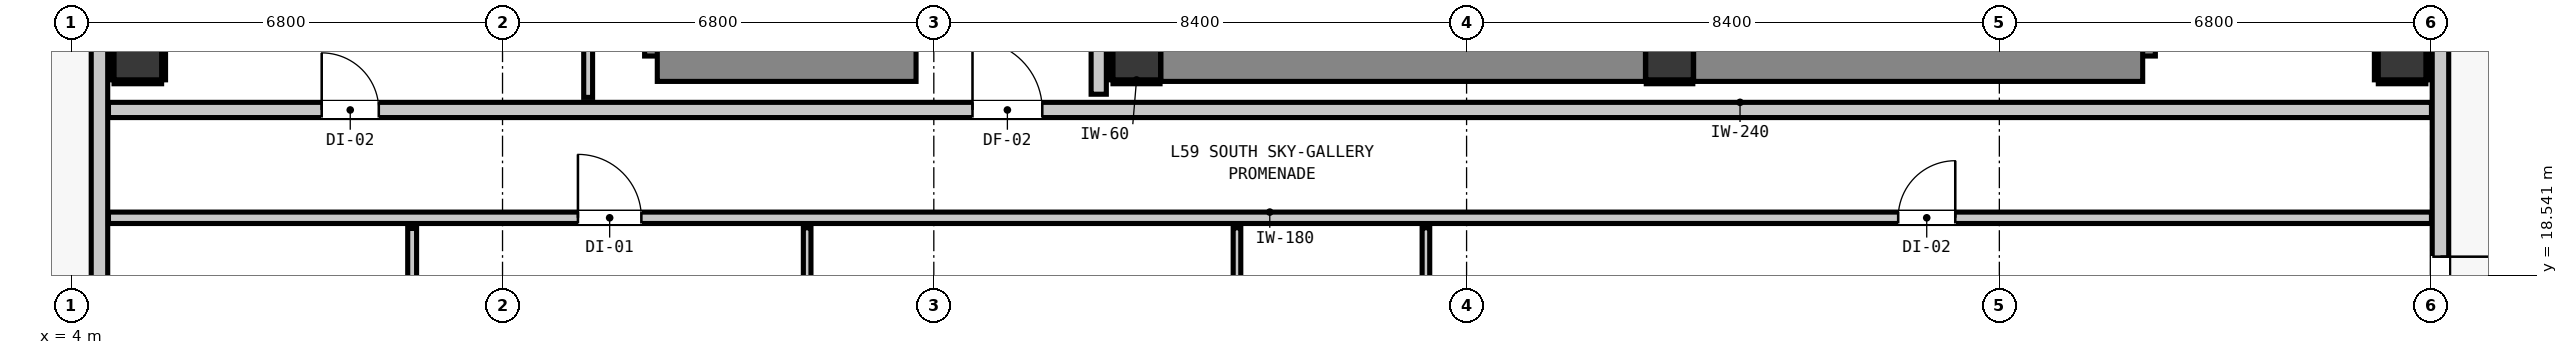
"""IFC4 building model, lengths in metres.
Left out: names, types, materials, properties, quantities, classifications, styles, units other than length and angle.
Written with IfcOpenShell. Run it as: python <this file> out.ifc"""

import sys

from ifc_helpers import new_model, si_unit, direction, frame, frame_2d, origin, origin_2d, place, context, subcontext, project, spatial, rectangle, extrude, element, fill, save


model = new_model("IFC4")
c1 = context("Model", 3, precision=1e-05, world=origin(), true_north=direction((0.0, 1.0)))
c2 = subcontext(c1, "Body", "Model", "MODEL_VIEW")
j1 = project(units=[si_unit("LENGTHUNIT", "METRE"), si_unit("PLANEANGLEUNIT", "RADIAN")], contexts=[c1])
p1 = place(None, origin())
s1 = spatial("IfcSite", under=j1, at=p1, CompositionType="ELEMENT")
p2 = place(p1, origin())
s2 = spatial("IfcBuilding", under=s1, at=p2, CompositionType="ELEMENT")
p3 = place(p2, frame((0.0, 0.0, 203.44)))
s3 = spatial("IfcBuildingStorey", under=s2, at=p3, CompositionType="ELEMENT", Elevation=203.44)
for number, where, z_axis, x_axis in (
    (1, (20.8, 22.0, 0.0), (0.0, 0.0, 1.0), (1.0, 0.0, 0.0)),
    (2, (29.2, 22.0, 0.0), (0.0, 0.0, 1.0), (1.0, 0.0, 0.0)),
):
    element("IfcColumn", number, at=place(p3, frame(where, z_axis=z_axis, x_axis=x_axis)), inside=s3, PredefinedType="COLUMN", context=c2, shape_type="SweptSolid", body=[
        extrude(rectangle(XDim=0.75, YDim=0.75, at=origin_2d()), origin(), (0.0, 0.0, 1.0), 3.32),
    ])
p4 = place(p3, frame((13.44, 22.0, 0.0), z_axis=(0.0, 0.0, 1.0), x_axis=(0.0, 1.0, 0.0)))
e3 = element("IfcWall", 3, at=p4, inside=s3, PredefinedType="SHEAR", context=c2, shape_type="SweptSolid", body=[
    extrude(rectangle(XDim=8.32, YDim=0.8, at=frame_2d((4.16, 0.0))), origin(), (0.0, 0.0, 1.0), 3.32),
])
p5 = place(p3, frame((13.24, 22.0, 0.0), z_axis=(0.0, 0.0, 1.0), x_axis=(1.0, 0.0, 0.0)))
e4 = element("IfcWall", 4, at=p5, inside=s3, PredefinedType="SHEAR", context=c2, shape_type="SweptSolid", body=[
    extrude(rectangle(XDim=4.08, YDim=0.8, at=frame_2d((2.04, 0.0))), origin(), (0.0, 0.0, 1.0), 3.32),
])
p6 = place(p3, frame((36.46, 22.0, 0.0), z_axis=(0.0, 0.0, 1.0), x_axis=(0.0, 1.0, 0.0)))
e5 = element("IfcWall", 5, at=p6, inside=s3, PredefinedType="SHEAR", context=c2, shape_type="SweptSolid", body=[
    extrude(rectangle(XDim=8.32, YDim=0.8, at=frame_2d((4.16, 0.0))), origin(), (0.0, 0.0, 1.0), 3.32),
])
p7 = place(p3, frame((29.58, 22.0, 0.0), z_axis=(0.0, 0.0, 1.0), x_axis=(1.0, 0.0, 0.0)))
e6 = element("IfcWall", 6, at=p7, inside=s3, PredefinedType="SHEAR", context=c2, shape_type="SweptSolid", body=[
    extrude(rectangle(XDim=7.08, YDim=0.8, at=frame_2d((3.54, 0.0))), origin(), (0.0, 0.0, 1.0), 3.32),
])
p8 = place(p3, frame((21.18, 22.0, 0.0), z_axis=(0.0, 0.0, 1.0), x_axis=(1.0, 0.0, 0.0)))
e7 = element("IfcWall", 7, at=p8, inside=s3, PredefinedType="SHEAR", context=c2, shape_type="SweptSolid", body=[
    extrude(rectangle(XDim=7.64, YDim=0.8, at=frame_2d((3.82, 0.0))), origin(), (0.0, 0.0, 1.0), 3.32),
])
for number, where, z_axis, x_axis in (
    (8, (5.05, 22.0, 0.0), (0.0, 0.0, 1.0), (1.0, 0.0, 0.0)),
    (9, (40.75, 22.0, 0.0), (0.0, 0.0, 1.0), (1.0, 0.0, 0.0)),
):
    element("IfcColumn", number, at=place(p3, frame(where, z_axis=z_axis, x_axis=x_axis)), inside=s3, PredefinedType="COLUMN", context=c2, shape_type="SweptSolid", body=[
        extrude(rectangle(XDim=0.75, YDim=0.75, at=origin_2d()), origin(), (0.0, 0.0, 1.0), 3.32),
    ])
p9 = place(p3, frame((4.445, 12.345, 0.0), z_axis=(0.0, 0.0, 1.0), x_axis=(0.0, 1.0, 0.0)))
e10 = element("IfcWall", 10, at=p9, inside=s3, PredefinedType="STANDARD", context=c2, shape_type="SweptSolid", body=[
    extrude(rectangle(XDim=30.31, YDim=0.26, at=frame_2d((15.155, 0.0))), origin(), (0.0, 0.0, 1.0), 3.1),
])
p10 = place(p9, frame((0.91, 0.0, 0.0)))
e11 = element("IfcOpeningElement", 11, at=p10, cuts=e10, PredefinedType="OPENING", context=c2, shape_type="SweptSolid", body=[
    extrude(rectangle(XDim=1.0, YDim=2.15, at=frame_2d((0.5, 1.075))), frame((0.0, 0.14, 0.0), z_axis=(0.0, -1.0, 0.0), x_axis=(1.0, 0.0, 0.0)), (0.0, 0.0, 1.0), 0.28),
])
p11 = place(p9, frame((2.322, 0.0, 0.85)))
e12 = element("IfcOpeningElement", 12, at=p11, cuts=e10, PredefinedType="OPENING", context=c2, shape_type="SweptSolid", body=[
    extrude(rectangle(XDim=0.58, YDim=1.5, at=frame_2d((0.29, 0.75))), frame((0.0, 0.14, 0.0), z_axis=(0.0, -1.0, 0.0), x_axis=(1.0, 0.0, 0.0)), (0.0, 0.0, 1.0), 0.28),
])
p12 = place(p9, frame((13.405, 0.0, 0.85)))
e13 = element("IfcOpeningElement", 13, at=p12, cuts=e10, PredefinedType="OPENING", context=c2, shape_type="SweptSolid", body=[
    extrude(rectangle(XDim=1.2, YDim=1.8, at=frame_2d((0.6, 0.9))), frame((0.0, 0.14, 0.0), z_axis=(0.0, -1.0, 0.0), x_axis=(1.0, 0.0, 0.0)), (0.0, 0.0, 1.0), 0.28),
])
p13 = place(p3, frame((41.355, 42.655, 0.0), z_axis=(0.0, 0.0, 1.0), x_axis=(0.0, -1.0, 0.0)))
e14 = element("IfcWall", 14, at=p13, inside=s3, PredefinedType="STANDARD", context=c2, shape_type="SweptSolid", body=[
    extrude(rectangle(XDim=30.31, YDim=0.26, at=frame_2d((15.155, 0.0))), origin(), (0.0, 0.0, 1.0), 3.1),
])
p14 = place(p13, frame((23.818, 0.0, 0.0)))
e15 = element("IfcOpeningElement", 15, at=p14, cuts=e14, PredefinedType="OPENING", context=c2, shape_type="SweptSolid", body=[
    extrude(rectangle(XDim=1.0, YDim=2.15, at=frame_2d((0.5, 1.075))), frame((0.0, 0.14, 0.0), z_axis=(0.0, -1.0, 0.0), x_axis=(1.0, 0.0, 0.0)), (0.0, 0.0, 1.0), 0.28),
])
p15 = place(p13, frame((27.019, 0.0, 0.85)))
e16 = element("IfcOpeningElement", 16, at=p15, cuts=e14, PredefinedType="OPENING", context=c2, shape_type="SweptSolid", body=[
    extrude(rectangle(XDim=1.2, YDim=1.8, at=frame_2d((0.6, 0.9))), frame((0.0, 0.14, 0.0), z_axis=(0.0, -1.0, 0.0), x_axis=(1.0, 0.0, 0.0)), (0.0, 0.0, 1.0), 0.28),
])
p16 = place(p3, frame((4.587, 21.15, 0.0), z_axis=(0.0, 0.0, 1.0), x_axis=(1.0, 0.0, 0.0)))
e17 = element("IfcWall", 17, at=p16, inside=s3, PredefinedType="PARTITIONING", context=c2, shape_type="SweptSolid", body=[
    extrude(rectangle(XDim=36.626, YDim=0.24, at=frame_2d((18.313, 0.0))), origin(), (0.0, 0.0, 1.0), 3.1),
])
p17 = place(p16, frame((13.623, 0.0, 0.0)))
e18 = element("IfcOpeningElement", 18, at=p17, cuts=e17, PredefinedType="OPENING", context=c2, shape_type="SweptSolid", body=[
    extrude(rectangle(XDim=1.1, YDim=2.15, at=frame_2d((0.55, 1.075))), frame((0.0, 0.13, 0.0), z_axis=(0.0, -1.0, 0.0), x_axis=(1.0, 0.0, 0.0)), (0.0, 0.0, 1.0), 0.26),
])
p18 = place(p16, frame((3.362, 0.0, 0.0)))
e19 = element("IfcOpeningElement", 19, at=p18, cuts=e17, PredefinedType="OPENING", context=c2, shape_type="SweptSolid", body=[
    extrude(rectangle(XDim=0.9, YDim=2.1, at=frame_2d((0.45, 1.05))), frame((0.0, 0.13, 0.0), z_axis=(0.0, -1.0, 0.0), x_axis=(1.0, 0.0, 0.0)), (0.0, 0.0, 1.0), 0.26),
])
p19 = place(p3, frame((4.587, 19.45, 0.0), z_axis=(0.0, 0.0, 1.0), x_axis=(1.0, 0.0, 0.0)))
e20 = element("IfcWall", 20, at=p19, inside=s3, PredefinedType="PARTITIONING", context=c2, shape_type="SweptSolid", body=[
    extrude(rectangle(XDim=36.626, YDim=0.18, at=frame_2d((18.313, 0.0))), origin(), (0.0, 0.0, 1.0), 3.1),
])
p20 = place(p19, frame((7.402, 0.0, 0.0)))
e21 = element("IfcOpeningElement", 21, at=p20, cuts=e20, PredefinedType="OPENING", context=c2, shape_type="SweptSolid", body=[
    extrude(rectangle(XDim=1.0, YDim=2.15, at=frame_2d((0.5, 1.075))), frame((0.0, 0.1, 0.0), z_axis=(0.0, -1.0, 0.0), x_axis=(1.0, 0.0, 0.0)), (0.0, 0.0, 1.0), 0.2),
])
p21 = place(p19, frame((28.218, 0.0, 0.0)))
e22 = element("IfcOpeningElement", 22, at=p21, cuts=e20, PredefinedType="OPENING", context=c2, shape_type="SweptSolid", body=[
    extrude(rectangle(XDim=0.9, YDim=2.1, at=frame_2d((0.45, 1.05))), frame((0.0, 0.1, 0.0), z_axis=(0.0, -1.0, 0.0), x_axis=(1.0, 0.0, 0.0)), (0.0, 0.0, 1.0), 0.2),
])
p22 = place(p3, frame((20.2, 21.398, 0.0), z_axis=(0.0, 0.0, 1.0), x_axis=(0.0, 1.0, 0.0)))
e23 = element("IfcWall", 23, at=p22, inside=s3, PredefinedType="PARTITIONING", context=c2, shape_type="SweptSolid", body=[
    extrude(rectangle(XDim=6.754, YDim=0.24, at=frame_2d((3.377, 0.0))), origin(), (0.0, 0.0, 1.0), 3.1),
])
p23 = place(p3, frame((9.375, 15.707, 0.0), z_axis=(0.0, 0.0, 1.0), x_axis=(0.0, 1.0, 0.0)))
e24 = element("IfcWall", 24, at=p23, inside=s3, PredefinedType="PARTITIONING", context=c2, shape_type="SweptSolid", body=[
    extrude(rectangle(XDim=3.575, YDim=0.14, at=frame_2d((1.788, 0.0))), origin(), (0.0, 0.0, 1.0), 2.477),
])
p24 = place(p23, frame((1.355, 0.0, 0.0)))
e25 = element("IfcOpeningElement", 25, at=p24, cuts=e24, PredefinedType="OPENING", context=c2, shape_type="SweptSolid", body=[
    extrude(rectangle(XDim=0.86, YDim=2.02, at=frame_2d((0.43, 1.01))), frame((0.0, 0.08, 0.0), z_axis=(0.0, -1.0, 0.0), x_axis=(1.0, 0.0, 0.0)), (0.0, 0.0, 1.0), 0.16),
])
p25 = place(p3, frame((12.15, 21.348, 0.0), z_axis=(0.0, 0.0, 1.0), x_axis=(0.0, 1.0, 0.0)))
e26 = element("IfcWall", 26, at=p25, inside=s3, PredefinedType="PARTITIONING", context=c2, shape_type="SweptSolid", body=[
    extrude(rectangle(XDim=13.004, YDim=0.14, at=frame_2d((6.502, 0.0))), origin(), (0.0, 0.0, 1.0), 3.1),
])
p26 = place(p3, frame((15.603, 15.697, 0.0), z_axis=(0.0, 0.0, 1.0), x_axis=(0.0, 1.0, 0.0)))
e27 = element("IfcWall", 27, at=p26, inside=s3, PredefinedType="PARTITIONING", context=c2, shape_type="SweptSolid", body=[
    extrude(rectangle(XDim=3.595, YDim=0.12, at=frame_2d((1.797, 0.0))), origin(), (0.0, 0.0, 1.0), 3.1),
])
p27 = place(p26, frame((1.345, 0.0, 0.0)))
e28 = element("IfcOpeningElement", 28, at=p27, cuts=e27, PredefinedType="OPENING", context=c2, shape_type="SweptSolid", body=[
    extrude(rectangle(XDim=0.9, YDim=2.1, at=frame_2d((0.45, 1.05))), frame((0.0, 0.07, 0.0), z_axis=(0.0, -1.0, 0.0), x_axis=(1.0, 0.0, 0.0)), (0.0, 0.0, 1.0), 0.14),
])
p28 = place(p3, frame((22.38, 15.697, 0.0), z_axis=(0.0, 0.0, 1.0), x_axis=(0.0, 1.0, 0.0)))
e29 = element("IfcWall", 29, at=p28, inside=s3, PredefinedType="PARTITIONING", context=c2, shape_type="SweptSolid", body=[
    extrude(rectangle(XDim=3.595, YDim=0.12, at=frame_2d((1.797, 0.0))), origin(), (0.0, 0.0, 1.0), 3.1),
])
p29 = place(p28, frame((1.358, 0.0, 0.0)))
e30 = element("IfcOpeningElement", 30, at=p29, cuts=e29, PredefinedType="OPENING", context=c2, shape_type="SweptSolid", body=[
    extrude(rectangle(XDim=0.9, YDim=2.1, at=frame_2d((0.45, 1.05))), frame((0.0, 0.07, 0.0), z_axis=(0.0, -1.0, 0.0), x_axis=(1.0, 0.0, 0.0)), (0.0, 0.0, 1.0), 0.14),
])
p30 = place(p3, frame((25.359, 15.697, 0.0), z_axis=(0.0, 0.0, 1.0), x_axis=(0.0, 1.0, 0.0)))
e31 = element("IfcWall", 31, at=p30, inside=s3, PredefinedType="PARTITIONING", context=c2, shape_type="SweptSolid", body=[
    extrude(rectangle(XDim=3.595, YDim=0.12, at=frame_2d((1.797, 0.0))), origin(), (0.0, 0.0, 1.0), 3.1),
])
p31 = place(p3, frame((20.425, 21.593, 0.0), z_axis=(0.0, 0.0, 1.0), x_axis=(1.0, 0.0, 0.0)))
e32 = element("IfcWall", 32, at=p31, inside=s3, PredefinedType="PARTITIONING", context=c2, shape_type="SweptSolid", body=[
    extrude(rectangle(XDim=0.742, YDim=0.06, at=frame_2d((0.371, 0.0))), origin(), (0.0, 0.0, 1.0), 1.45),
])
p32 = place(p3, frame((20.393, 21.625, 0.0), z_axis=(0.0, 0.0, 1.0), x_axis=(0.0, 1.0, 0.0)))
e33 = element("IfcWall", 33, at=p32, inside=s3, PredefinedType="PARTITIONING", context=c2, shape_type="SweptSolid", body=[
    extrude(rectangle(XDim=0.75, YDim=0.06, at=frame_2d((0.375, 0.0))), origin(), (0.0, 0.0, 1.0), 1.45),
])
p33 = place(p3, frame((28.833, 21.593, 0.0), z_axis=(0.0, 0.0, 1.0), x_axis=(1.0, 0.0, 0.0)))
e34 = element("IfcWall", 34, at=p33, inside=s3, PredefinedType="PARTITIONING", context=c2, shape_type="SweptSolid", body=[
    extrude(rectangle(XDim=0.734, YDim=0.06, at=frame_2d((0.367, 0.0))), origin(), (0.0, 0.0, 1.0), 1.45),
])
for number, where, z_axis, x_axis in (
    (35, (4.675, 21.593, 0.0), (0.0, 0.0, 1.0), (1.0, 0.0, 0.0)),
    (36, (4.643, 21.625, 0.0), (0.0, 0.0, 1.0), (0.0, 1.0, 0.0)),
    (37, (5.457, 21.625, 0.0), (0.0, 0.0, 1.0), (0.0, 1.0, 0.0)),
    (38, (40.375, 21.593, 0.0), (0.0, 0.0, 1.0), (1.0, 0.0, 0.0)),
    (39, (40.343, 21.625, 0.0), (0.0, 0.0, 1.0), (0.0, 1.0, 0.0)),
    (40, (41.157, 21.625, 0.0), (0.0, 0.0, 1.0), (0.0, 1.0, 0.0)),
):
    element("IfcWall", number, at=place(p3, frame(where, z_axis=z_axis, x_axis=x_axis)), inside=s3, PredefinedType="PARTITIONING", context=c2, shape_type="SweptSolid", body=[
        extrude(rectangle(XDim=0.75, YDim=0.06, at=frame_2d((0.375, 0.0))), origin(), (0.0, 0.0, 1.0), 1.45),
    ])
p34 = place(p14, origin())
e41 = element("IfcDoor", 41, at=p34, inside=s3, OperationType="SINGLE_SWING_LEFT", PredefinedType="DOOR", context=c2, shape_type="SweptSolid", body=[
    extrude(rectangle(XDim=1.0, YDim=2.15, at=frame_2d((0.5, 1.075))), frame((0.0, 0.025, 0.0), z_axis=(0.0, -1.0, 0.0), x_axis=(1.0, 0.0, 0.0)), (0.0, 0.0, 1.0), 0.05),
])
fill(e15, e41)
p35 = place(p17, origin())
e42 = element("IfcDoor", 42, at=p35, inside=s3, OperationType="SINGLE_SWING_LEFT", PredefinedType="DOOR", context=c2, shape_type="SweptSolid", body=[
    extrude(rectangle(XDim=1.1, YDim=2.15, at=frame_2d((0.55, 1.075))), frame((0.0, 0.025, 0.0), z_axis=(0.0, -1.0, 0.0), x_axis=(1.0, 0.0, 0.0)), (0.0, 0.0, 1.0), 0.05),
])
fill(e18, e42)
p36 = place(p20, origin())
e43 = element("IfcDoor", 43, at=p36, inside=s3, OperationType="SINGLE_SWING_LEFT", PredefinedType="DOOR", context=c2, shape_type="SweptSolid", body=[
    extrude(rectangle(XDim=1.0, YDim=2.15, at=frame_2d((0.5, 1.075))), frame((0.0, 0.025, 0.0), z_axis=(0.0, -1.0, 0.0), x_axis=(1.0, 0.0, 0.0)), (0.0, 0.0, 1.0), 0.05),
])
fill(e21, e43)
p37 = place(p21, origin())
e44 = element("IfcDoor", 44, at=p37, inside=s3, OperationType="SINGLE_SWING_RIGHT", PredefinedType="DOOR", context=c2, shape_type="SweptSolid", body=[
    extrude(rectangle(XDim=0.9, YDim=2.1, at=frame_2d((0.45, 1.05))), frame((0.0, 0.025, 0.0), z_axis=(0.0, -1.0, 0.0), x_axis=(1.0, 0.0, 0.0)), (0.0, 0.0, 1.0), 0.05),
])
fill(e22, e44)
p38 = place(p18, origin())
e45 = element("IfcDoor", 45, at=p38, inside=s3, OperationType="SINGLE_SWING_LEFT", PredefinedType="DOOR", context=c2, shape_type="SweptSolid", body=[
    extrude(rectangle(XDim=0.9, YDim=2.1, at=frame_2d((0.45, 1.05))), frame((0.0, 0.025, 0.0), z_axis=(0.0, -1.0, 0.0), x_axis=(1.0, 0.0, 0.0)), (0.0, 0.0, 1.0), 0.05),
])
fill(e19, e45)
save(model, sys.argv[1])
